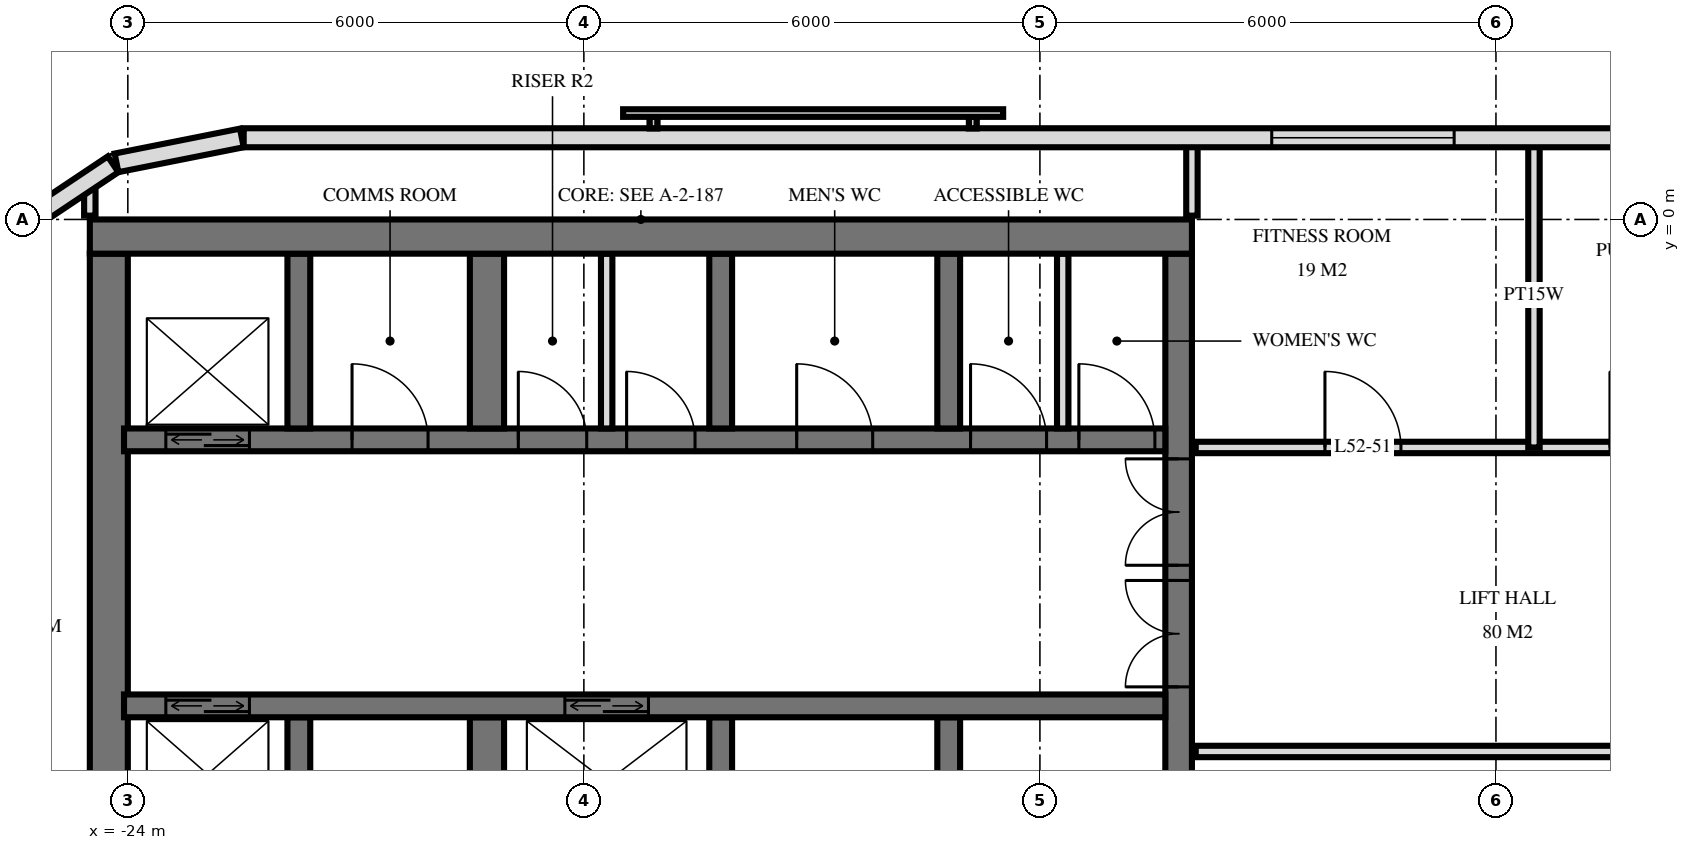
"""IFC4 building model, lengths in metres.
Left out: names, types, materials, properties, quantities, classifications, styles, units other than length and angle.
Written with IfcOpenShell. Run it as: python <this file> out.ifc"""

import sys

from ifc_helpers import new_model, si_unit, direction, frame, frame_2d, origin, place, context, subcontext, project, spatial, rectangle, extrude, element, fill, save


model = new_model("IFC4")
c1 = context("Model", 3, precision=1e-05, world=origin(), true_north=direction((0.0, 1.0)))
c2 = subcontext(c1, "Body", "Model", "MODEL_VIEW")
j1 = project(units=[si_unit("LENGTHUNIT", "METRE"), si_unit("PLANEANGLEUNIT", "RADIAN")], contexts=[c1])
p1 = place(None, origin())
s1 = spatial("IfcSite", under=j1, at=p1, CompositionType="ELEMENT")
p2 = place(p1, origin())
s2 = spatial("IfcBuilding", under=s1, at=p2, CompositionType="ELEMENT")
p3 = place(p2, frame((0.0, 0.0, 201.1)))
s3 = spatial("IfcBuildingStorey", under=s2, at=p3, CompositionType="ELEMENT", Elevation=201.1)
p4 = place(p3, frame((-24.5, -0.225, 0.0), z_axis=(0.0, 0.0, 1.0), x_axis=(1.0, 0.0, 0.0)))
e1 = element("IfcWall", 1, at=p4, inside=s3, PredefinedType="SHEAR", context=c2, shape_type="SweptSolid", body=[
    extrude(rectangle(XDim=14.5, YDim=0.45, at=frame_2d((7.25, 0.0))), origin(), (0.0, 0.0, 1.0), 3.5),
])
p5 = place(p3, frame((-10.175, -14.55, 0.0), z_axis=(0.0, 0.0, 1.0), x_axis=(0.0, 1.0, 0.0)))
e2 = element("IfcWall", 2, at=p5, inside=s3, PredefinedType="SHEAR", context=c2, shape_type="SweptSolid", body=[
    extrude(rectangle(XDim=14.1, YDim=0.35, at=frame_2d((7.05, 0.0))), origin(), (0.0, 0.0, 1.0), 3.5),
])
p6 = place(p5, frame((8.4, 0.0, 0.0)))
e3 = element("IfcOpeningElement", 3, at=p6, cuts=e2, PredefinedType="OPENING", context=c2, shape_type="SweptSolid", body=[
    extrude(rectangle(XDim=1.4, YDim=2.4, at=frame_2d((0.7, 1.2))), frame((0.0, 0.185, 0.0), z_axis=(0.0, -1.0, 0.0), x_axis=(1.0, 0.0, 0.0)), (0.0, 0.0, 1.0), 0.37),
])
p7 = place(p5, frame((10.0, 0.0, 0.0)))
e4 = element("IfcOpeningElement", 4, at=p7, cuts=e2, PredefinedType="OPENING", context=c2, shape_type="SweptSolid", body=[
    extrude(rectangle(XDim=1.4, YDim=2.4, at=frame_2d((0.7, 1.2))), frame((0.0, 0.185, 0.0), z_axis=(0.0, -1.0, 0.0), x_axis=(1.0, 0.0, 0.0)), (0.0, 0.0, 1.0), 0.37),
])
p8 = place(p5, frame((4.0, 0.0, 0.0)))
e5 = element("IfcOpeningElement", 5, at=p8, cuts=e2, PredefinedType="OPENING", context=c2, shape_type="SweptSolid", body=[
    extrude(rectangle(XDim=1.2, YDim=2.1, at=frame_2d((0.6, 1.05))), frame((0.0, 0.185, 0.0), z_axis=(0.0, -1.0, 0.0), x_axis=(1.0, 0.0, 0.0)), (0.0, 0.0, 1.0), 0.37),
])
p9 = place(p3, frame((-24.25, -14.55, 0.0), z_axis=(0.0, 0.0, 1.0), x_axis=(0.0, 1.0, 0.0)))
e6 = element("IfcWall", 6, at=p9, inside=s3, PredefinedType="SHEAR", context=c2, shape_type="SweptSolid", body=[
    extrude(rectangle(XDim=14.1, YDim=0.5, at=frame_2d((7.05, 0.0))), origin(), (0.0, 0.0, 1.0), 3.5),
])
p10 = place(p3, frame((-24.05, -2.9, 0.0), z_axis=(0.0, 0.0, 1.0), x_axis=(1.0, 0.0, 0.0)))
e7 = element("IfcWall", 7, at=p10, inside=s3, PredefinedType="SHEAR", context=c2, shape_type="SweptSolid", body=[
    extrude(rectangle(XDim=13.7, YDim=0.3, at=frame_2d((6.85, 0.0))), origin(), (0.0, 0.0, 1.0), 3.5),
])
p11 = place(p10, frame((0.55, 0.0, 0.0)))
e8 = element("IfcOpeningElement", 8, at=p11, cuts=e7, PredefinedType="OPENING", context=c2, shape_type="SweptSolid", body=[
    extrude(rectangle(XDim=1.1, YDim=2.1, at=frame_2d((0.55, 1.05))), frame((0.0, 0.16, 0.0), z_axis=(0.0, -1.0, 0.0), x_axis=(1.0, 0.0, 0.0)), (0.0, 0.0, 1.0), 0.32),
])
p12 = place(p10, frame((6.613, 0.0, 0.0)))
e9 = element("IfcOpeningElement", 9, at=p12, cuts=e7, PredefinedType="OPENING", context=c2, shape_type="SweptSolid", body=[
    extrude(rectangle(XDim=0.9, YDim=2.1, at=frame_2d((0.45, 1.05))), frame((0.0, 0.16, 0.0), z_axis=(0.0, -1.0, 0.0), x_axis=(1.0, 0.0, 0.0)), (0.0, 0.0, 1.0), 0.32),
])
p13 = place(p10, frame((5.188, 0.0, 0.0)))
e10 = element("IfcOpeningElement", 10, at=p13, cuts=e7, PredefinedType="OPENING", context=c2, shape_type="SweptSolid", body=[
    extrude(rectangle(XDim=0.9, YDim=2.1, at=frame_2d((0.45, 1.05))), frame((0.0, 0.16, 0.0), z_axis=(0.0, -1.0, 0.0), x_axis=(1.0, 0.0, 0.0)), (0.0, 0.0, 1.0), 0.32),
])
p14 = place(p10, frame((12.562, 0.0, 0.0)))
e11 = element("IfcOpeningElement", 11, at=p14, cuts=e7, PredefinedType="OPENING", context=c2, shape_type="SweptSolid", body=[
    extrude(rectangle(XDim=1.0, YDim=2.1, at=frame_2d((0.5, 1.05))), frame((0.0, 0.16, 0.0), z_axis=(0.0, -1.0, 0.0), x_axis=(1.0, 0.0, 0.0)), (0.0, 0.0, 1.0), 0.32),
])
p15 = place(p10, frame((11.137, 0.0, 0.0)))
e12 = element("IfcOpeningElement", 12, at=p15, cuts=e7, PredefinedType="OPENING", context=c2, shape_type="SweptSolid", body=[
    extrude(rectangle(XDim=1.0, YDim=2.1, at=frame_2d((0.5, 1.05))), frame((0.0, 0.16, 0.0), z_axis=(0.0, -1.0, 0.0), x_axis=(1.0, 0.0, 0.0)), (0.0, 0.0, 1.0), 0.32),
])
p16 = place(p10, frame((8.85, 0.0, 0.0)))
e13 = element("IfcOpeningElement", 13, at=p16, cuts=e7, PredefinedType="OPENING", context=c2, shape_type="SweptSolid", body=[
    extrude(rectangle(XDim=1.0, YDim=2.1, at=frame_2d((0.5, 1.05))), frame((0.0, 0.16, 0.0), z_axis=(0.0, -1.0, 0.0), x_axis=(1.0, 0.0, 0.0)), (0.0, 0.0, 1.0), 0.32),
])
p17 = place(p10, frame((3.0, 0.0, 0.0)))
e14 = element("IfcOpeningElement", 14, at=p17, cuts=e7, PredefinedType="OPENING", context=c2, shape_type="SweptSolid", body=[
    extrude(rectangle(XDim=1.0, YDim=2.1, at=frame_2d((0.5, 1.05))), frame((0.0, 0.16, 0.0), z_axis=(0.0, -1.0, 0.0), x_axis=(1.0, 0.0, 0.0)), (0.0, 0.0, 1.0), 0.32),
])
p18 = place(p3, frame((-24.05, -6.4, 0.0), z_axis=(0.0, 0.0, 1.0), x_axis=(1.0, 0.0, 0.0)))
e15 = element("IfcWall", 15, at=p18, inside=s3, PredefinedType="SHEAR", context=c2, shape_type="SweptSolid", body=[
    extrude(rectangle(XDim=13.7, YDim=0.3, at=frame_2d((6.85, 0.0))), origin(), (0.0, 0.0, 1.0), 3.5),
])
p19 = place(p18, frame((0.55, 0.0, 0.0)))
e16 = element("IfcOpeningElement", 16, at=p19, cuts=e15, PredefinedType="OPENING", context=c2, shape_type="SweptSolid", body=[
    extrude(rectangle(XDim=1.1, YDim=2.1, at=frame_2d((0.55, 1.05))), frame((0.0, 0.16, 0.0), z_axis=(0.0, -1.0, 0.0), x_axis=(1.0, 0.0, 0.0)), (0.0, 0.0, 1.0), 0.32),
])
p20 = place(p18, frame((5.8, 0.0, 0.0)))
e17 = element("IfcOpeningElement", 17, at=p20, cuts=e15, PredefinedType="OPENING", context=c2, shape_type="SweptSolid", body=[
    extrude(rectangle(XDim=1.1, YDim=2.1, at=frame_2d((0.55, 1.05))), frame((0.0, 0.16, 0.0), z_axis=(0.0, -1.0, 0.0), x_axis=(1.0, 0.0, 0.0)), (0.0, 0.0, 1.0), 0.32),
])
for number, where, z_axis, x_axis in (
    (18, (-13.2, -2.75, 0.0), (0.0, 0.0, 1.0), (0.0, 1.0, 0.0)),
    (19, (-13.2, -8.85, 0.0), (0.0, 0.0, 1.0), (0.0, 1.0, 0.0)),
    (20, (-16.2, -2.75, 0.0), (0.0, 0.0, 1.0), (0.0, 1.0, 0.0)),
    (21, (-16.2, -8.85, 0.0), (0.0, 0.0, 1.0), (0.0, 1.0, 0.0)),
):
    element("IfcWall", number, at=place(p3, frame(where, z_axis=z_axis, x_axis=x_axis)), inside=s3, PredefinedType="SHEAR", context=c2, shape_type="SweptSolid", body=[
        extrude(rectangle(XDim=2.3, YDim=0.3, at=frame_2d((1.15, 0.0))), origin(), (0.0, 0.0, 1.0), 3.5),
    ])
for number, where, z_axis, x_axis in (
    (22, (-19.275, -2.75, 0.0), (0.0, 0.0, 1.0), (0.0, 1.0, 0.0)),
    (23, (-19.275, -8.85, 0.0), (0.0, 0.0, 1.0), (0.0, 1.0, 0.0)),
):
    element("IfcWall", number, at=place(p3, frame(where, z_axis=z_axis, x_axis=x_axis)), inside=s3, PredefinedType="SHEAR", context=c2, shape_type="SweptSolid", body=[
        extrude(rectangle(XDim=2.3, YDim=0.45, at=frame_2d((1.15, 0.0))), origin(), (0.0, 0.0, 1.0), 3.5),
    ])
for number, where, z_axis, x_axis in (
    (24, (-21.75, -2.75, 0.0), (0.0, 0.0, 1.0), (0.0, 1.0, 0.0)),
    (25, (-21.75, -8.85, 0.0), (0.0, 0.0, 1.0), (0.0, 1.0, 0.0)),
):
    element("IfcWall", number, at=place(p3, frame(where, z_axis=z_axis, x_axis=x_axis)), inside=s3, PredefinedType="SHEAR", context=c2, shape_type="SweptSolid", body=[
        extrude(rectangle(XDim=2.3, YDim=0.3, at=frame_2d((1.15, 0.0))), origin(), (0.0, 0.0, 1.0), 3.5),
    ])
p21 = place(p3, frame((22.475, 1.075, 0.0), z_axis=(0.0, 0.0, 1.0), x_axis=(-1.0, 0.0, 0.0)))
e26 = element("IfcWall", 26, at=p21, inside=s3, PredefinedType="SOLIDWALL", context=c2, shape_type="SweptSolid", body=[
    extrude(rectangle(XDim=44.951, YDim=0.25, at=frame_2d((22.475, 0.0))), origin(), (0.0, 0.0, 1.0), 3.22),
])
p22 = place(p21, frame((13.775, 0.0, 0.9)))
e27 = element("IfcOpeningElement", 27, at=p22, cuts=e26, PredefinedType="OPENING", context=c2, shape_type="SweptSolid", body=[
    extrude(rectangle(XDim=2.4, YDim=1.5, at=frame_2d((1.2, 0.75))), frame((0.0, 0.135, 0.0), z_axis=(0.0, -1.0, 0.0), x_axis=(1.0, 0.0, 0.0)), (0.0, 0.0, 1.0), 0.27),
])
p23 = place(p21, frame((18.275, 0.0, 0.9)))
e28 = element("IfcOpeningElement", 28, at=p23, cuts=e26, PredefinedType="OPENING", context=c2, shape_type="SweptSolid", body=[
    extrude(rectangle(XDim=2.4, YDim=1.5, at=frame_2d((1.2, 0.75))), frame((0.0, 0.135, 0.0), z_axis=(0.0, -1.0, 0.0), x_axis=(1.0, 0.0, 0.0)), (0.0, 0.0, 1.0), 0.27),
])
p24 = place(p21, frame((29.025, 0.0, 0.9)))
e29 = element("IfcOpeningElement", 29, at=p24, cuts=e26, PredefinedType="OPENING", context=c2, shape_type="SweptSolid", body=[
    extrude(rectangle(XDim=2.4, YDim=1.5, at=frame_2d((1.2, 0.75))), frame((0.0, 0.135, 0.0), z_axis=(0.0, -1.0, 0.0), x_axis=(1.0, 0.0, 0.0)), (0.0, 0.0, 1.0), 0.27),
])
p25 = place(p3, frame((-22.5, 1.073, 0.0), z_axis=(0.0, 0.0, 1.0), x_axis=(-0.980803419081, -0.194999110559, 0.0)))
e30 = element("IfcWall", 30, at=p25, inside=s3, PredefinedType="SOLIDWALL", context=c2, shape_type="SweptSolid", body=[
    extrude(rectangle(XDim=1.681, YDim=0.25, at=frame_2d((0.841, 0.0))), origin(), (0.0, 0.0, 1.0), 3.22),
])
p26 = place(p3, frame((-24.194, 0.726, 0.0), z_axis=(0.0, 0.0, 1.0), x_axis=(-0.831482937015, -0.55555029066, 0.0)))
e31 = element("IfcWall", 31, at=p26, inside=s3, PredefinedType="SOLIDWALL", context=c2, shape_type="SweptSolid", body=[
    extrude(rectangle(XDim=1.656, YDim=0.25, at=frame_2d((0.828, 0.0))), origin(), (0.0, 0.0, 1.0), 3.22),
])
for number, where, z_axis, x_axis in (
    (32, (-17.7, -2.75, 0.0), (0.0, 0.0, 1.0), (0.0, 1.0, 0.0)),
    (33, (-11.7, -2.75, 0.0), (0.0, 0.0, 1.0), (0.0, 1.0, 0.0)),
):
    element("IfcWall", number, at=place(p3, frame(where, z_axis=z_axis, x_axis=x_axis)), inside=s3, PredefinedType="PARTITIONING", context=c2, shape_type="SweptSolid", body=[
        extrude(rectangle(XDim=2.3, YDim=0.15, at=frame_2d((1.15, 0.0))), origin(), (0.0, 0.0, 1.0), 3.2),
    ])
p27 = place(p3, frame((-5.5, -3.0, 0.0), z_axis=(0.0, 0.0, 1.0), x_axis=(0.0, 1.0, 0.0)))
e34 = element("IfcWall", 34, at=p27, inside=s3, PredefinedType="PLUMBINGWALL", context=c2, shape_type="SweptSolid", body=[
    extrude(rectangle(XDim=4.02, YDim=0.15, at=frame_2d((2.01, 0.0))), origin(), (0.0, 0.0, 1.0), 3.22),
])
p28 = place(p3, frame((-10.0, 0.05, 0.0), z_axis=(0.0, 0.0, 1.0), x_axis=(0.0, 1.0, 0.0)))
e35 = element("IfcWall", 35, at=p28, inside=s3, PredefinedType="PARTITIONING", context=c2, shape_type="SweptSolid", body=[
    extrude(rectangle(XDim=0.97, YDim=0.15, at=frame_2d((0.485, 0.0))), origin(), (0.0, 0.0, 1.0), 3.22),
])
p29 = place(p3, frame((-24.5, 0.05, 0.0), z_axis=(0.0, 0.0, 1.0), x_axis=(0.0, 1.0, 0.0)))
e36 = element("IfcWall", 36, at=p29, inside=s3, PredefinedType="PARTITIONING", context=c2, shape_type="SweptSolid", body=[
    extrude(rectangle(XDim=0.405, YDim=0.15, at=frame_2d((0.203, 0.0))), origin(), (0.0, 0.0, 1.0), 3.22),
])
p30 = place(p3, frame((-9.95, -7.0, 0.0), z_axis=(0.0, 0.0, 1.0), x_axis=(1.0, 0.0, 0.0)))
e37 = element("IfcWall", 37, at=p30, inside=s3, PredefinedType="PARTITIONING", context=c2, shape_type="SweptSolid", body=[
    extrude(rectangle(XDim=19.9, YDim=0.15, at=frame_2d((9.95, 0.0))), origin(), (0.0, 0.0, 1.0), 3.22),
])
p31 = place(p30, frame((9.45, 0.0, 0.0)))
e38 = element("IfcOpeningElement", 38, at=p31, cuts=e37, PredefinedType="OPENING", context=c2, shape_type="SweptSolid", body=[
    extrude(rectangle(XDim=1.0, YDim=2.1, at=frame_2d((0.5, 1.05))), frame((0.0, 0.085, 0.0), z_axis=(0.0, -1.0, 0.0), x_axis=(1.0, 0.0, 0.0)), (0.0, 0.0, 1.0), 0.17),
])
p32 = place(p30, frame((15.45, 0.0, 0.0)))
e39 = element("IfcOpeningElement", 39, at=p32, cuts=e37, PredefinedType="OPENING", context=c2, shape_type="SweptSolid", body=[
    extrude(rectangle(XDim=1.0, YDim=2.1, at=frame_2d((0.5, 1.05))), frame((0.0, 0.085, 0.0), z_axis=(0.0, -1.0, 0.0), x_axis=(1.0, 0.0, 0.0)), (0.0, 0.0, 1.0), 0.17),
])
p33 = place(p3, frame((-9.95, -3.0, 0.0), z_axis=(0.0, 0.0, 1.0), x_axis=(1.0, 0.0, 0.0)))
e40 = element("IfcWall", 40, at=p33, inside=s3, PredefinedType="PARTITIONING", context=c2, shape_type="SweptSolid", body=[
    extrude(rectangle(XDim=19.9, YDim=0.15, at=frame_2d((9.95, 0.0))), origin(), (0.0, 0.0, 1.0), 3.22),
])
p34 = place(p33, frame((1.7, 0.0, 0.0)))
e41 = element("IfcOpeningElement", 41, at=p34, cuts=e40, PredefinedType="OPENING", context=c2, shape_type="SweptSolid", body=[
    extrude(rectangle(XDim=1.0, YDim=2.1, at=frame_2d((0.5, 1.05))), frame((0.0, 0.085, 0.0), z_axis=(0.0, -1.0, 0.0), x_axis=(1.0, 0.0, 0.0)), (0.0, 0.0, 1.0), 0.17),
])
p35 = place(p33, frame((5.45, 0.0, 0.0)))
e42 = element("IfcOpeningElement", 42, at=p35, cuts=e40, PredefinedType="OPENING", context=c2, shape_type="SweptSolid", body=[
    extrude(rectangle(XDim=1.0, YDim=2.1, at=frame_2d((0.5, 1.05))), frame((0.0, 0.085, 0.0), z_axis=(0.0, -1.0, 0.0), x_axis=(1.0, 0.0, 0.0)), (0.0, 0.0, 1.0), 0.17),
])
p36 = place(p33, frame((8.2, 0.0, 0.0)))
e43 = element("IfcOpeningElement", 43, at=p36, cuts=e40, PredefinedType="OPENING", context=c2, shape_type="SweptSolid", body=[
    extrude(rectangle(XDim=1.0, YDim=2.1, at=frame_2d((0.5, 1.05))), frame((0.0, 0.085, 0.0), z_axis=(0.0, -1.0, 0.0), x_axis=(1.0, 0.0, 0.0)), (0.0, 0.0, 1.0), 0.17),
])
p37 = place(p33, frame((11.95, 0.0, 0.0)))
e44 = element("IfcOpeningElement", 44, at=p37, cuts=e40, PredefinedType="OPENING", context=c2, shape_type="SweptSolid", body=[
    extrude(rectangle(XDim=1.0, YDim=2.1, at=frame_2d((0.5, 1.05))), frame((0.0, 0.085, 0.0), z_axis=(0.0, -1.0, 0.0), x_axis=(1.0, 0.0, 0.0)), (0.0, 0.0, 1.0), 0.17),
])
p38 = place(p33, frame((16.95, 0.0, 0.0)))
e45 = element("IfcOpeningElement", 45, at=p38, cuts=e40, PredefinedType="OPENING", context=c2, shape_type="SweptSolid", body=[
    extrude(rectangle(XDim=1.0, YDim=2.1, at=frame_2d((0.5, 1.05))), frame((0.0, 0.085, 0.0), z_axis=(0.0, -1.0, 0.0), x_axis=(1.0, 0.0, 0.0)), (0.0, 0.0, 1.0), 0.17),
])
p39 = place(p24, origin())
e46 = element("IfcWindow", 46, at=p39, inside=s3, PartitioningType="SINGLE_PANEL", PredefinedType="WINDOW", context=c2, shape_type="SweptSolid", body=[
    extrude(rectangle(XDim=2.4, YDim=1.5, at=frame_2d((1.2, 0.75))), frame((0.0, 0.03, 0.0), z_axis=(0.0, -1.0, 0.0), x_axis=(1.0, 0.0, 0.0)), (0.0, 0.0, 1.0), 0.06),
])
fill(e29, e46)
p40 = place(p11, origin())
e47 = element("IfcDoor", 47, at=p40, inside=s3, OperationType="DOUBLE_DOOR_SLIDING", PredefinedType="USERDEFINED", context=c2, shape_type="SweptSolid", body=[
    extrude(rectangle(XDim=1.1, YDim=2.1, at=frame_2d((0.55, 1.05))), frame((0.0, 0.025, 0.0), z_axis=(0.0, -1.0, 0.0), x_axis=(1.0, 0.0, 0.0)), (0.0, 0.0, 1.0), 0.05),
])
fill(e8, e47)
p41 = place(p19, origin())
e48 = element("IfcDoor", 48, at=p41, inside=s3, OperationType="DOUBLE_DOOR_SLIDING", PredefinedType="USERDEFINED", context=c2, shape_type="SweptSolid", body=[
    extrude(rectangle(XDim=1.1, YDim=2.1, at=frame_2d((0.55, 1.05))), frame((0.0, 0.025, 0.0), z_axis=(0.0, -1.0, 0.0), x_axis=(1.0, 0.0, 0.0)), (0.0, 0.0, 1.0), 0.05),
])
fill(e16, e48)
p42 = place(p20, origin())
e49 = element("IfcDoor", 49, at=p42, inside=s3, OperationType="DOUBLE_DOOR_SLIDING", PredefinedType="USERDEFINED", context=c2, shape_type="SweptSolid", body=[
    extrude(rectangle(XDim=1.1, YDim=2.1, at=frame_2d((0.55, 1.05))), frame((0.0, 0.025, 0.0), z_axis=(0.0, -1.0, 0.0), x_axis=(1.0, 0.0, 0.0)), (0.0, 0.0, 1.0), 0.05),
])
fill(e17, e49)
p43 = place(p6, origin())
e50 = element("IfcDoor", 50, at=p43, inside=s3, OperationType="DOUBLE_DOOR_SINGLE_SWING", PredefinedType="DOOR", context=c2, shape_type="SweptSolid", body=[
    extrude(rectangle(XDim=1.4, YDim=2.4, at=frame_2d((0.7, 1.2))), frame((0.0, 0.025, 0.0), z_axis=(0.0, -1.0, 0.0), x_axis=(1.0, 0.0, 0.0)), (0.0, 0.0, 1.0), 0.05),
])
fill(e3, e50)
p44 = place(p7, origin())
e51 = element("IfcDoor", 51, at=p44, inside=s3, OperationType="DOUBLE_DOOR_SINGLE_SWING", PredefinedType="DOOR", context=c2, shape_type="SweptSolid", body=[
    extrude(rectangle(XDim=1.4, YDim=2.4, at=frame_2d((0.7, 1.2))), frame((0.0, 0.025, 0.0), z_axis=(0.0, -1.0, 0.0), x_axis=(1.0, 0.0, 0.0)), (0.0, 0.0, 1.0), 0.05),
])
fill(e4, e51)
p45 = place(p12, origin())
e52 = element("IfcDoor", 52, at=p45, inside=s3, OperationType="SINGLE_SWING_RIGHT", PredefinedType="DOOR", context=c2, shape_type="SweptSolid", body=[
    extrude(rectangle(XDim=0.9, YDim=2.1, at=frame_2d((0.45, 1.05))), frame((0.0, 0.025, 0.0), z_axis=(0.0, -1.0, 0.0), x_axis=(1.0, 0.0, 0.0)), (0.0, 0.0, 1.0), 0.05),
])
fill(e9, e52)
p46 = place(p13, origin())
e53 = element("IfcDoor", 53, at=p46, inside=s3, OperationType="SINGLE_SWING_RIGHT", PredefinedType="DOOR", context=c2, shape_type="SweptSolid", body=[
    extrude(rectangle(XDim=0.9, YDim=2.1, at=frame_2d((0.45, 1.05))), frame((0.0, 0.025, 0.0), z_axis=(0.0, -1.0, 0.0), x_axis=(1.0, 0.0, 0.0)), (0.0, 0.0, 1.0), 0.05),
])
fill(e10, e53)
p47 = place(p14, origin())
e54 = element("IfcDoor", 54, at=p47, inside=s3, OperationType="SINGLE_SWING_RIGHT", PredefinedType="DOOR", context=c2, shape_type="SweptSolid", body=[
    extrude(rectangle(XDim=1.0, YDim=2.1, at=frame_2d((0.5, 1.05))), frame((0.0, 0.025, 0.0), z_axis=(0.0, -1.0, 0.0), x_axis=(1.0, 0.0, 0.0)), (0.0, 0.0, 1.0), 0.05),
])
fill(e11, e54)
p48 = place(p15, origin())
e55 = element("IfcDoor", 55, at=p48, inside=s3, OperationType="SINGLE_SWING_RIGHT", PredefinedType="DOOR", context=c2, shape_type="SweptSolid", body=[
    extrude(rectangle(XDim=1.0, YDim=2.1, at=frame_2d((0.5, 1.05))), frame((0.0, 0.025, 0.0), z_axis=(0.0, -1.0, 0.0), x_axis=(1.0, 0.0, 0.0)), (0.0, 0.0, 1.0), 0.05),
])
fill(e12, e55)
p49 = place(p16, origin())
e56 = element("IfcDoor", 56, at=p49, inside=s3, OperationType="SINGLE_SWING_RIGHT", PredefinedType="DOOR", context=c2, shape_type="SweptSolid", body=[
    extrude(rectangle(XDim=1.0, YDim=2.1, at=frame_2d((0.5, 1.05))), frame((0.0, 0.025, 0.0), z_axis=(0.0, -1.0, 0.0), x_axis=(1.0, 0.0, 0.0)), (0.0, 0.0, 1.0), 0.05),
])
fill(e13, e56)
p50 = place(p17, origin())
e57 = element("IfcDoor", 57, at=p50, inside=s3, OperationType="SINGLE_SWING_RIGHT", PredefinedType="DOOR", context=c2, shape_type="SweptSolid", body=[
    extrude(rectangle(XDim=1.0, YDim=2.1, at=frame_2d((0.5, 1.05))), frame((0.0, 0.025, 0.0), z_axis=(0.0, -1.0, 0.0), x_axis=(1.0, 0.0, 0.0)), (0.0, 0.0, 1.0), 0.05),
])
fill(e14, e57)
p51 = place(p34, origin())
e58 = element("IfcDoor", 58, at=p51, inside=s3, OperationType="SINGLE_SWING_RIGHT", PredefinedType="DOOR", context=c2, shape_type="SweptSolid", body=[
    extrude(rectangle(XDim=1.0, YDim=2.1, at=frame_2d((0.5, 1.05))), frame((0.0, 0.025, 0.0), z_axis=(0.0, -1.0, 0.0), x_axis=(1.0, 0.0, 0.0)), (0.0, 0.0, 1.0), 0.05),
])
fill(e41, e58)
save(model, sys.argv[1])
